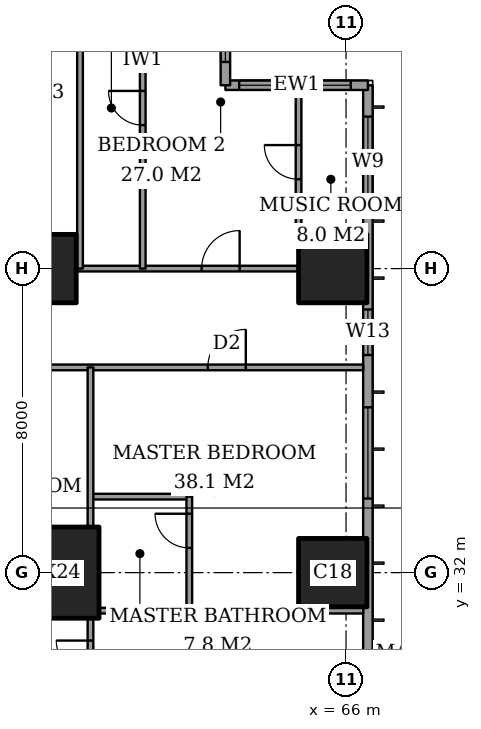
"""IFC4 building model, lengths in metres.
Left out: names, types, materials, properties, quantities, classifications, styles, units other than length and angle.
Written with IfcOpenShell. Run it as: python <this file> out.ifc"""

import sys

from ifc_helpers import new_model, si_unit, direction, frame, frame_2d, origin, origin_2d, place, context, subcontext, project, spatial, rectangle, extrude, element, fill, save


model = new_model("IFC4")
c1 = context("Model", 3, precision=1e-05, world=origin(), true_north=direction((0.0, 1.0)))
c2 = subcontext(c1, "Body", "Model", "MODEL_VIEW")
j1 = project(units=[si_unit("LENGTHUNIT", "METRE"), si_unit("PLANEANGLEUNIT", "RADIAN")], contexts=[c1])
p1 = place(None, origin())
s1 = spatial("IfcSite", under=j1, at=p1, CompositionType="ELEMENT")
p2 = place(p1, origin())
s2 = spatial("IfcBuilding", under=s1, at=p2, CompositionType="ELEMENT")
p3 = place(p2, frame((0.0, 0.0, 221.8)))
s3 = spatial("IfcBuildingStorey", under=s2, at=p3, CompositionType="ELEMENT", Elevation=221.8)
p4 = place(p3, frame((58.0, 32.0, 0.0), z_axis=(0.0, 0.0, 1.0), x_axis=(1.0, 0.0, 0.0)))
e1 = element("IfcColumn", 1, at=p4, inside=s3, PredefinedType="COLUMN", context=c2, shape_type="SweptSolid", body=[
    extrude(rectangle(XDim=3.0, YDim=2.4, at=origin_2d()), origin(), (0.0, 0.0, 1.0), 3.6),
])
for number, where, z_axis, x_axis in (
    (2, (58.0, 40.0, 0.0), (0.0, 0.0, 1.0), (1.0, 0.0, 0.0)),
    (3, (65.65, 32.0, 0.0), (0.0, 0.0, 1.0), (1.0, 0.0, 0.0)),
    (4, (65.65, 40.0, 0.0), (0.0, 0.0, 1.0), (1.0, 0.0, 0.0)),
):
    element("IfcColumn", number, at=place(p3, frame(where, z_axis=z_axis, x_axis=x_axis)), inside=s3, PredefinedType="COLUMN", context=c2, shape_type="SweptSolid", body=[
        extrude(rectangle(XDim=1.8, YDim=1.8, at=origin_2d()), origin(), (0.0, 0.0, 1.0), 3.6),
    ])
p5 = place(p3, frame((66.575, 3.175, 0.0), z_axis=(0.0, 0.0, 1.0), x_axis=(0.0, 1.0, 0.0)))
e5 = element("IfcWall", 5, at=p5, inside=s3, PredefinedType="SOLIDWALL", context=c2, shape_type="SweptSolid", body=[
    extrude(rectangle(XDim=41.65, YDim=0.25, at=frame_2d((20.825, 0.0))), origin(), (0.0, 0.0, 1.0), 3.6),
])
p6 = place(p5, frame((0.825, 0.0, 0.2)))
e6 = element("IfcOpeningElement", 6, at=p6, cuts=e5, PredefinedType="OPENING", context=c2, shape_type="SweptSolid", body=[
    extrude(rectangle(XDim=2.4, YDim=2.4, at=frame_2d((1.2, 1.2))), frame((0.0, 0.135, 0.0), z_axis=(0.0, -1.0, 0.0), x_axis=(1.0, 0.0, 0.0)), (0.0, 0.0, 1.0), 0.27),
])
p7 = place(p5, frame((6.225, 0.0, 0.2)))
e7 = element("IfcOpeningElement", 7, at=p7, cuts=e5, PredefinedType="OPENING", context=c2, shape_type="SweptSolid", body=[
    extrude(rectangle(XDim=1.2, YDim=2.4, at=frame_2d((0.6, 1.2))), frame((0.0, 0.135, 0.0), z_axis=(0.0, -1.0, 0.0), x_axis=(1.0, 0.0, 0.0)), (0.0, 0.0, 1.0), 0.27),
])
p8 = place(p5, frame((8.675, 0.0, 0.2)))
e8 = element("IfcOpeningElement", 8, at=p8, cuts=e5, PredefinedType="OPENING", context=c2, shape_type="SweptSolid", body=[
    extrude(rectangle(XDim=2.4, YDim=2.4, at=frame_2d((1.2, 1.2))), frame((0.0, 0.135, 0.0), z_axis=(0.0, -1.0, 0.0), x_axis=(1.0, 0.0, 0.0)), (0.0, 0.0, 1.0), 0.27),
])
p9 = place(p5, frame((15.675, 0.0, 0.2)))
e9 = element("IfcOpeningElement", 9, at=p9, cuts=e5, PredefinedType="OPENING", context=c2, shape_type="SweptSolid", body=[
    extrude(rectangle(XDim=2.4, YDim=2.4, at=frame_2d((1.2, 1.2))), frame((0.0, 0.135, 0.0), z_axis=(0.0, -1.0, 0.0), x_axis=(1.0, 0.0, 0.0)), (0.0, 0.0, 1.0), 0.27),
])
p10 = place(p5, frame((23.575, 0.0, 0.2)))
e10 = element("IfcOpeningElement", 10, at=p10, cuts=e5, PredefinedType="OPENING", context=c2, shape_type="SweptSolid", body=[
    extrude(rectangle(XDim=2.4, YDim=2.4, at=frame_2d((1.2, 1.2))), frame((0.0, 0.135, 0.0), z_axis=(0.0, -1.0, 0.0), x_axis=(1.0, 0.0, 0.0)), (0.0, 0.0, 1.0), 0.27),
])
p11 = place(p5, frame((30.775, 0.0, 0.2)))
e11 = element("IfcOpeningElement", 11, at=p11, cuts=e5, PredefinedType="OPENING", context=c2, shape_type="SweptSolid", body=[
    extrude(rectangle(XDim=2.4, YDim=2.4, at=frame_2d((1.2, 1.2))), frame((0.0, 0.135, 0.0), z_axis=(0.0, -1.0, 0.0), x_axis=(1.0, 0.0, 0.0)), (0.0, 0.0, 1.0), 0.27),
])
p12 = place(p5, frame((34.55, 0.0, 0.2)))
e12 = element("IfcOpeningElement", 12, at=p12, cuts=e5, PredefinedType="OPENING", context=c2, shape_type="SweptSolid", body=[
    extrude(rectangle(XDim=1.2, YDim=2.4, at=frame_2d((0.6, 1.2))), frame((0.0, 0.135, 0.0), z_axis=(0.0, -1.0, 0.0), x_axis=(1.0, 0.0, 0.0)), (0.0, 0.0, 1.0), 0.27),
])
p13 = place(p5, frame((38.425, 0.0, 0.2)))
e13 = element("IfcOpeningElement", 13, at=p13, cuts=e5, PredefinedType="OPENING", context=c2, shape_type="SweptSolid", body=[
    extrude(rectangle(XDim=2.4, YDim=2.4, at=frame_2d((1.2, 1.2))), frame((0.0, 0.135, 0.0), z_axis=(0.0, -1.0, 0.0), x_axis=(1.0, 0.0, 0.0)), (0.0, 0.0, 1.0), 0.27),
])
p14 = place(p3, frame((66.575, 44.825, 0.0), z_axis=(0.0, 0.0, 1.0), x_axis=(-1.0, 0.0, 0.0)))
e14 = element("IfcWall", 14, at=p14, inside=s3, PredefinedType="SOLIDWALL", context=c2, shape_type="SweptSolid", body=[
    extrude(rectangle(XDim=3.75, YDim=0.25, at=frame_2d((1.875, 0.0))), origin(), (0.0, 0.0, 1.0), 3.6),
])
p15 = place(p14, frame((0.45, 0.0, 0.2)))
e15 = element("IfcOpeningElement", 15, at=p15, cuts=e14, PredefinedType="OPENING", context=c2, shape_type="SweptSolid", body=[
    extrude(rectangle(XDim=1.2, YDim=2.4, at=frame_2d((0.6, 1.2))), frame((0.0, 0.135, 0.0), z_axis=(0.0, -1.0, 0.0), x_axis=(1.0, 0.0, 0.0)), (0.0, 0.0, 1.0), 0.27),
])
p16 = place(p14, frame((2.188, 0.0, 0.2)))
e16 = element("IfcOpeningElement", 16, at=p16, cuts=e14, PredefinedType="OPENING", context=c2, shape_type="SweptSolid", body=[
    extrude(rectangle(XDim=1.2, YDim=2.4, at=frame_2d((0.6, 1.2))), frame((0.0, 0.135, 0.0), z_axis=(0.0, -1.0, 0.0), x_axis=(1.0, 0.0, 0.0)), (0.0, 0.0, 1.0), 0.27),
])
p17 = place(p3, frame((62.825, 44.825, 0.0), z_axis=(0.0, 0.0, 1.0), x_axis=(0.0, 1.0, 0.0)))
e17 = element("IfcWall", 17, at=p17, inside=s3, PredefinedType="SOLIDWALL", context=c2, shape_type="SweptSolid", body=[
    extrude(rectangle(XDim=3.75, YDim=0.25, at=frame_2d((1.875, 0.0))), origin(), (0.0, 0.0, 1.0), 3.6),
])
p18 = place(p17, frame((0.613, 0.0, 0.2)))
e18 = element("IfcOpeningElement", 18, at=p18, cuts=e17, PredefinedType="OPENING", context=c2, shape_type="SweptSolid", body=[
    extrude(rectangle(XDim=2.4, YDim=2.4, at=frame_2d((1.2, 1.2))), frame((0.0, 0.135, 0.0), z_axis=(0.0, -1.0, 0.0), x_axis=(1.0, 0.0, 0.0)), (0.0, 0.0, 1.0), 0.27),
])
p19 = place(p3, frame((59.5, 31.0, 0.0), z_axis=(0.0, 0.0, 1.0), x_axis=(1.0, 0.0, 0.0)))
e19 = element("IfcWall", 19, at=p19, inside=s3, PredefinedType="PARTITIONING", context=c2, shape_type="SweptSolid", body=[
    extrude(rectangle(XDim=6.95, YDim=0.15, at=frame_2d((3.475, 0.0))), origin(), (0.0, 0.0, 1.0), 3.25),
])
p20 = place(p3, frame((59.275, 34.0, 0.0), z_axis=(0.0, 0.0, 1.0), x_axis=(1.0, 0.0, 0.0)))
e20 = element("IfcWall", 20, at=p20, inside=s3, PredefinedType="PARTITIONING", context=c2, shape_type="SweptSolid", body=[
    extrude(rectangle(XDim=2.6, YDim=0.15, at=frame_2d((1.3, 0.0))), origin(), (0.0, 0.0, 1.0), 3.25),
])
p21 = place(p3, frame((41.439, 37.4, 0.0), z_axis=(0.0, 0.0, 1.0), x_axis=(1.0, 0.0, 0.0)))
e21 = element("IfcWall", 21, at=p21, inside=s3, PredefinedType="PARTITIONING", context=c2, shape_type="SweptSolid", body=[
    extrude(rectangle(XDim=25.011, YDim=0.15, at=frame_2d((12.505, 0.0))), origin(), (0.0, 0.0, 1.0), 3.25),
])
p22 = place(p21, frame((10.761, 0.0, 0.0)))
e22 = element("IfcOpeningElement", 22, at=p22, cuts=e21, PredefinedType="OPENING", context=c2, shape_type="SweptSolid", body=[
    extrude(rectangle(XDim=1.0, YDim=2.1, at=frame_2d((0.5, 1.05))), frame((0.0, 0.085, 0.0), z_axis=(0.0, -1.0, 0.0), x_axis=(1.0, 0.0, 0.0)), (0.0, 0.0, 1.0), 0.17),
])
p23 = place(p21, frame((20.924, 0.0, 0.0)))
e23 = element("IfcOpeningElement", 23, at=p23, cuts=e21, PredefinedType="OPENING", context=c2, shape_type="SweptSolid", body=[
    extrude(rectangle(XDim=1.0, YDim=2.1, at=frame_2d((0.5, 1.05))), frame((0.0, 0.085, 0.0), z_axis=(0.0, -1.0, 0.0), x_axis=(1.0, 0.0, 0.0)), (0.0, 0.0, 1.0), 0.17),
])
p24 = place(p21, frame((15.749, 0.0, 0.0)))
e24 = element("IfcOpeningElement", 24, at=p24, cuts=e21, PredefinedType="OPENING", context=c2, shape_type="SweptSolid", body=[
    extrude(rectangle(XDim=0.9, YDim=2.1, at=frame_2d((0.45, 1.05))), frame((0.0, 0.085, 0.0), z_axis=(0.0, -1.0, 0.0), x_axis=(1.0, 0.0, 0.0)), (0.0, 0.0, 1.0), 0.17),
])
p25 = place(p21, frame((12.961, 0.0, 0.0)))
e25 = element("IfcOpeningElement", 25, at=p25, cuts=e21, PredefinedType="OPENING", context=c2, shape_type="SweptSolid", body=[
    extrude(rectangle(XDim=1.0, YDim=2.1, at=frame_2d((0.5, 1.05))), frame((0.0, 0.085, 0.0), z_axis=(0.0, -1.0, 0.0), x_axis=(1.0, 0.0, 0.0)), (0.0, 0.0, 1.0), 0.17),
])
p26 = place(p21, frame((7.911, 0.0, 0.0)))
e26 = element("IfcOpeningElement", 26, at=p26, cuts=e21, PredefinedType="OPENING", context=c2, shape_type="SweptSolid", body=[
    extrude(rectangle(XDim=0.9, YDim=2.1, at=frame_2d((0.45, 1.05))), frame((0.0, 0.085, 0.0), z_axis=(0.0, -1.0, 0.0), x_axis=(1.0, 0.0, 0.0)), (0.0, 0.0, 1.0), 0.17),
])
p27 = place(p21, frame((2.836, 0.0, 0.0)))
e27 = element("IfcOpeningElement", 27, at=p27, cuts=e21, PredefinedType="OPENING", context=c2, shape_type="SweptSolid", body=[
    extrude(rectangle(XDim=1.0, YDim=2.1, at=frame_2d((0.5, 1.05))), frame((0.0, 0.085, 0.0), z_axis=(0.0, -1.0, 0.0), x_axis=(1.0, 0.0, 0.0)), (0.0, 0.0, 1.0), 0.17),
])
p28 = place(p3, frame((58.9, 40.0, 0.0), z_axis=(0.0, 0.0, 1.0), x_axis=(1.0, 0.0, 0.0)))
e28 = element("IfcWall", 28, at=p28, inside=s3, PredefinedType="PARTITIONING", context=c2, shape_type="SweptSolid", body=[
    extrude(rectangle(XDim=5.85, YDim=0.15, at=frame_2d((2.925, 0.0))), origin(), (0.0, 0.0, 1.0), 3.25),
])
p29 = place(p28, frame((3.3, 0.0, 0.0)))
e29 = element("IfcOpeningElement", 29, at=p29, cuts=e28, PredefinedType="OPENING", context=c2, shape_type="SweptSolid", body=[
    extrude(rectangle(XDim=1.0, YDim=2.1, at=frame_2d((0.5, 1.05))), frame((0.0, 0.085, 0.0), z_axis=(0.0, -1.0, 0.0), x_axis=(1.0, 0.0, 0.0)), (0.0, 0.0, 1.0), 0.17),
])
p30 = place(p3, frame((59.0, 40.0, 0.0), z_axis=(0.0, 0.0, 1.0), x_axis=(0.0, 1.0, 0.0)))
e30 = element("IfcWall", 30, at=p30, inside=s3, PredefinedType="PARTITIONING", context=c2, shape_type="SweptSolid", body=[
    extrude(rectangle(XDim=8.45, YDim=0.15, at=frame_2d((4.225, 0.0))), origin(), (0.0, 0.0, 1.0), 3.25),
])
p31 = place(p3, frame((59.275, 28.35, 0.0), z_axis=(0.0, 0.0, 1.0), x_axis=(0.0, 1.0, 0.0)))
e31 = element("IfcWall", 31, at=p31, inside=s3, PredefinedType="PARTITIONING", context=c2, shape_type="SweptSolid", body=[
    extrude(rectangle(XDim=2.45, YDim=0.15, at=frame_2d((1.225, 0.0))), origin(), (0.0, 0.0, 1.0), 3.25),
])
p32 = place(p31, frame((0.962, 0.0, 0.0)))
e32 = element("IfcOpeningElement", 32, at=p32, cuts=e31, PredefinedType="OPENING", context=c2, shape_type="SweptSolid", body=[
    extrude(rectangle(XDim=0.9, YDim=2.1, at=frame_2d((0.45, 1.05))), frame((0.0, 0.085, 0.0), z_axis=(0.0, -1.0, 0.0), x_axis=(1.0, 0.0, 0.0)), (0.0, 0.0, 1.0), 0.17),
])
p33 = place(p3, frame((59.275, 33.2, 0.0), z_axis=(0.0, 0.0, 1.0), x_axis=(0.0, 1.0, 0.0)))
e33 = element("IfcWall", 33, at=p33, inside=s3, PredefinedType="PARTITIONING", context=c2, shape_type="SweptSolid", body=[
    extrude(rectangle(XDim=4.2, YDim=0.15, at=frame_2d((2.1, 0.0))), origin(), (0.0, 0.0, 1.0), 3.25),
])
p34 = place(p3, frame((60.65, 40.0, 0.0), z_axis=(0.0, 0.0, 1.0), x_axis=(0.0, 1.0, 0.0)))
e34 = element("IfcWall", 34, at=p34, inside=s3, PredefinedType="PARTITIONING", context=c2, shape_type="SweptSolid", body=[
    extrude(rectangle(XDim=8.45, YDim=0.15, at=frame_2d((4.225, 0.0))), origin(), (0.0, 0.0, 1.0), 3.25),
])
p35 = place(p34, frame((3.775, 0.0, 0.0)))
e35 = element("IfcOpeningElement", 35, at=p35, cuts=e34, PredefinedType="OPENING", context=c2, shape_type="SweptSolid", body=[
    extrude(rectangle(XDim=0.9, YDim=2.1, at=frame_2d((0.45, 1.05))), frame((0.0, 0.085, 0.0), z_axis=(0.0, -1.0, 0.0), x_axis=(1.0, 0.0, 0.0)), (0.0, 0.0, 1.0), 0.17),
])
p36 = place(p3, frame((61.875, 31.0, 0.0), z_axis=(0.0, 0.0, 1.0), x_axis=(0.0, 1.0, 0.0)))
e36 = element("IfcWall", 36, at=p36, inside=s3, PredefinedType="PARTITIONING", context=c2, shape_type="SweptSolid", body=[
    extrude(rectangle(XDim=3.0, YDim=0.15, at=frame_2d((1.5, 0.0))), origin(), (0.0, 0.0, 1.0), 3.25),
])
p37 = place(p36, frame((1.65, 0.0, 0.0)))
e37 = element("IfcOpeningElement", 37, at=p37, cuts=e36, PredefinedType="OPENING", context=c2, shape_type="SweptSolid", body=[
    extrude(rectangle(XDim=0.9, YDim=2.1, at=frame_2d((0.45, 1.05))), frame((0.0, 0.085, 0.0), z_axis=(0.0, -1.0, 0.0), x_axis=(1.0, 0.0, 0.0)), (0.0, 0.0, 1.0), 0.17),
])
p38 = place(p3, frame((64.75, 40.9, 0.0), z_axis=(0.0, 0.0, 1.0), x_axis=(0.0, 1.0, 0.0)))
e38 = element("IfcWall", 38, at=p38, inside=s3, PredefinedType="PARTITIONING", context=c2, shape_type="SweptSolid", body=[
    extrude(rectangle(XDim=3.8, YDim=0.15, at=frame_2d((1.9, 0.0))), origin(), (0.0, 0.0, 1.0), 3.25),
])
p39 = place(p38, frame((1.45, 0.0, 0.0)))
e39 = element("IfcOpeningElement", 39, at=p39, cuts=e38, PredefinedType="OPENING", context=c2, shape_type="SweptSolid", body=[
    extrude(rectangle(XDim=0.9, YDim=2.1, at=frame_2d((0.45, 1.05))), frame((0.0, 0.085, 0.0), z_axis=(0.0, -1.0, 0.0), x_axis=(1.0, 0.0, 0.0)), (0.0, 0.0, 1.0), 0.17),
])
p40 = place(p11, origin())
e40 = element("IfcWindow", 40, at=p40, inside=s3, PartitioningType="SINGLE_PANEL", PredefinedType="WINDOW", context=c2, shape_type="SweptSolid", body=[
    extrude(rectangle(XDim=2.4, YDim=2.4, at=frame_2d((1.2, 1.2))), frame((0.0, 0.03, 0.0), z_axis=(0.0, -1.0, 0.0), x_axis=(1.0, 0.0, 0.0)), (0.0, 0.0, 1.0), 0.06),
])
fill(e11, e40)
p41 = place(p12, origin())
e41 = element("IfcWindow", 41, at=p41, inside=s3, PartitioningType="SINGLE_PANEL", PredefinedType="WINDOW", context=c2, shape_type="SweptSolid", body=[
    extrude(rectangle(XDim=1.2, YDim=2.4, at=frame_2d((0.6, 1.2))), frame((0.0, 0.03, 0.0), z_axis=(0.0, -1.0, 0.0), x_axis=(1.0, 0.0, 0.0)), (0.0, 0.0, 1.0), 0.06),
])
fill(e12, e41)
p42 = place(p13, origin())
e42 = element("IfcWindow", 42, at=p42, inside=s3, PartitioningType="SINGLE_PANEL", PredefinedType="WINDOW", context=c2, shape_type="SweptSolid", body=[
    extrude(rectangle(XDim=2.4, YDim=2.4, at=frame_2d((1.2, 1.2))), frame((0.0, 0.03, 0.0), z_axis=(0.0, -1.0, 0.0), x_axis=(1.0, 0.0, 0.0)), (0.0, 0.0, 1.0), 0.06),
])
fill(e13, e42)
p43 = place(p15, origin())
e43 = element("IfcWindow", 43, at=p43, inside=s3, PartitioningType="SINGLE_PANEL", PredefinedType="WINDOW", context=c2, shape_type="SweptSolid", body=[
    extrude(rectangle(XDim=1.2, YDim=2.4, at=frame_2d((0.6, 1.2))), frame((0.0, 0.03, 0.0), z_axis=(0.0, -1.0, 0.0), x_axis=(1.0, 0.0, 0.0)), (0.0, 0.0, 1.0), 0.06),
])
fill(e15, e43)
p44 = place(p16, origin())
e44 = element("IfcWindow", 44, at=p44, inside=s3, PartitioningType="SINGLE_PANEL", PredefinedType="WINDOW", context=c2, shape_type="SweptSolid", body=[
    extrude(rectangle(XDim=1.2, YDim=2.4, at=frame_2d((0.6, 1.2))), frame((0.0, 0.03, 0.0), z_axis=(0.0, -1.0, 0.0), x_axis=(1.0, 0.0, 0.0)), (0.0, 0.0, 1.0), 0.06),
])
fill(e16, e44)
p45 = place(p18, origin())
e45 = element("IfcWindow", 45, at=p45, inside=s3, PartitioningType="SINGLE_PANEL", PredefinedType="WINDOW", context=c2, shape_type="SweptSolid", body=[
    extrude(rectangle(XDim=2.4, YDim=2.4, at=frame_2d((1.2, 1.2))), frame((0.0, 0.03, 0.0), z_axis=(0.0, -1.0, 0.0), x_axis=(1.0, 0.0, 0.0)), (0.0, 0.0, 1.0), 0.06),
])
fill(e18, e45)
p46 = place(p39, origin())
e46 = element("IfcDoor", 46, at=p46, inside=s3, OperationType="SINGLE_SWING_LEFT", PredefinedType="DOOR", context=c2, shape_type="SweptSolid", body=[
    extrude(rectangle(XDim=0.9, YDim=2.1, at=frame_2d((0.45, 1.05))), frame((0.0, 0.025, 0.0), z_axis=(0.0, -1.0, 0.0), x_axis=(1.0, 0.0, 0.0)), (0.0, 0.0, 1.0), 0.05),
])
fill(e39, e46)
p47 = place(p29, origin())
e47 = element("IfcDoor", 47, at=p47, inside=s3, OperationType="SINGLE_SWING_LEFT", PredefinedType="DOOR", context=c2, shape_type="SweptSolid", body=[
    extrude(rectangle(XDim=1.0, YDim=2.1, at=frame_2d((0.5, 1.05))), frame((0.0, 0.025, 0.0), z_axis=(0.0, -1.0, 0.0), x_axis=(1.0, 0.0, 0.0)), (0.0, 0.0, 1.0), 0.05),
])
fill(e29, e47)
p48 = place(p35, origin())
e48 = element("IfcDoor", 48, at=p48, inside=s3, OperationType="SINGLE_SWING_LEFT", PredefinedType="DOOR", context=c2, shape_type="SweptSolid", body=[
    extrude(rectangle(XDim=0.9, YDim=2.1, at=frame_2d((0.45, 1.05))), frame((0.0, 0.025, 0.0), z_axis=(0.0, -1.0, 0.0), x_axis=(1.0, 0.0, 0.0)), (0.0, 0.0, 1.0), 0.05),
])
fill(e35, e48)
p49 = place(p37, origin())
e49 = element("IfcDoor", 49, at=p49, inside=s3, OperationType="SINGLE_SWING_LEFT", PredefinedType="DOOR", context=c2, shape_type="SweptSolid", body=[
    extrude(rectangle(XDim=0.9, YDim=2.1, at=frame_2d((0.45, 1.05))), frame((0.0, 0.025, 0.0), z_axis=(0.0, -1.0, 0.0), x_axis=(1.0, 0.0, 0.0)), (0.0, 0.0, 1.0), 0.05),
])
fill(e37, e49)
p50 = place(p23, origin())
e50 = element("IfcDoor", 50, at=p50, inside=s3, OperationType="SINGLE_SWING_LEFT", PredefinedType="DOOR", context=c2, shape_type="SweptSolid", body=[
    extrude(rectangle(XDim=1.0, YDim=2.1, at=frame_2d((0.5, 1.05))), frame((0.0, 0.025, 0.0), z_axis=(0.0, -1.0, 0.0), x_axis=(1.0, 0.0, 0.0)), (0.0, 0.0, 1.0), 0.05),
])
fill(e23, e50)
p51 = place(p32, origin())
e51 = element("IfcDoor", 51, at=p51, inside=s3, OperationType="SINGLE_SWING_LEFT", PredefinedType="DOOR", context=c2, shape_type="SweptSolid", body=[
    extrude(rectangle(XDim=0.9, YDim=2.1, at=frame_2d((0.45, 1.05))), frame((0.0, 0.025, 0.0), z_axis=(0.0, -1.0, 0.0), x_axis=(1.0, 0.0, 0.0)), (0.0, 0.0, 1.0), 0.05),
])
fill(e32, e51)
save(model, sys.argv[1])
